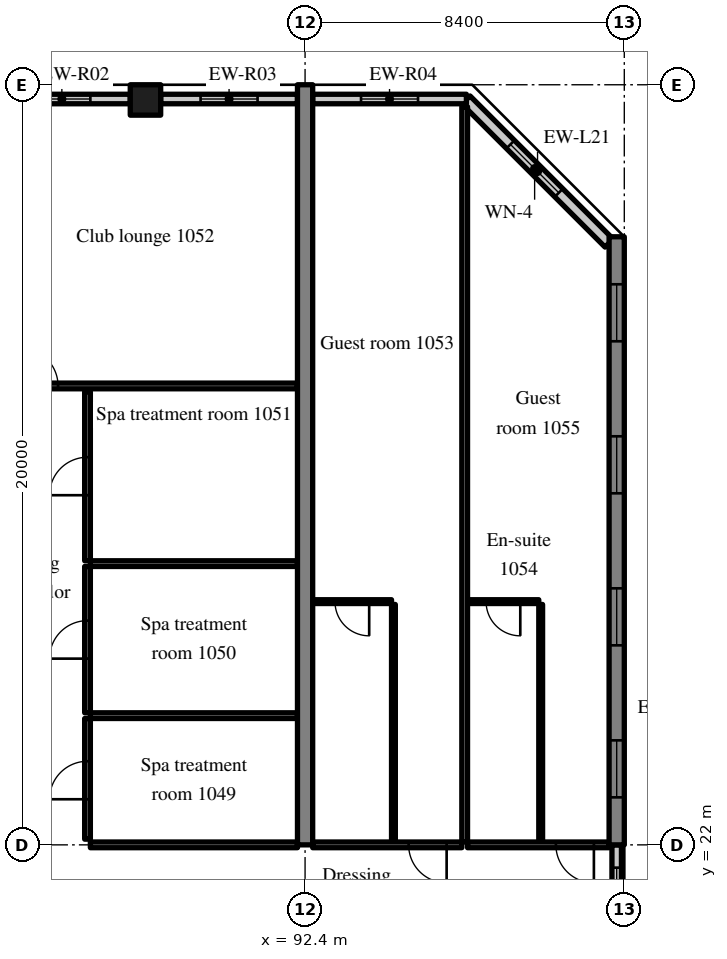
"""IFC4 building model, lengths in metres.
Left out: names, types, materials, properties, quantities, classifications, styles, units other than length and angle.
Written with IfcOpenShell. Run it as: python <this file> out.ifc"""

import sys

from ifc_helpers import new_model, si_unit, direction, frame, frame_2d, origin, origin_2d, place, context, subcontext, project, spatial, rectangle, extrude, source, transform, mapped, element, fill, save


model = new_model("IFC4")
c1 = context("Model", 3, precision=1e-05, world=origin(), true_north=direction((0.0, 1.0)))
c2 = subcontext(c1, "Body", "Model", "MODEL_VIEW")
j1 = project(units=[si_unit("LENGTHUNIT", "METRE"), si_unit("PLANEANGLEUNIT", "RADIAN")], contexts=[c1])
p1 = place(None, origin())
s1 = spatial("IfcSite", under=j1, at=p1, CompositionType="ELEMENT")
p2 = place(p1, origin())
s2 = spatial("IfcBuilding", under=s1, at=p2, CompositionType="ELEMENT")
p3 = place(p2, frame((0.0, 0.0, 46.8)))
s3 = spatial("IfcBuildingStorey", under=s2, at=p3, CompositionType="ELEMENT", Elevation=46.8)
m1 = source(origin(), c2, "Body", "SweptSolid", [
    extrude(rectangle(XDim=20.0, YDim=0.4, at=frame_2d((10.0, 0.0))), origin(), (0.0, 0.0, 1.0), 3.52),
])
p4 = place(p3, frame((92.4, 22.0, 0.0), z_axis=(0.0, 0.0, 1.0), x_axis=(0.0, 1.0, 0.0)))
e1 = element("IfcWall", 1, at=p4, inside=s3, PredefinedType="SHEAR", context=c2, shape_type="MappedRepresentation", body=[
    mapped(m1, transform((0.0, 0.0, 0.0), scale=1.0)),
])
m2 = source(origin(), c2, "Body", "SweptSolid", [
    extrude(rectangle(XDim=16.0, YDim=0.4, at=frame_2d((8.0, 0.0))), origin(), (0.0, 0.0, 1.0), 3.52),
])
p5 = place(p3, frame((100.6, 22.0, 0.0), z_axis=(0.0, 0.0, 1.0), x_axis=(0.0, 1.0, 0.0)))
e2 = element("IfcWall", 2, at=p5, inside=s3, PredefinedType="SHEAR", context=c2, shape_type="MappedRepresentation", body=[
    mapped(m2, transform((0.0, 0.0, 0.0), scale=1.0)),
])
m3 = source(origin(), c2, "Body", "SweptSolid", [
    extrude(rectangle(XDim=1.5, YDim=1.5, at=frame_2d((0.75, 0.75))), frame((0.0, 0.21, 0.0), z_axis=(0.0, -1.0, 0.0), x_axis=(1.0, 0.0, 0.0)), (0.0, 0.0, 1.0), 0.42),
])
p6 = place(p5, frame((1.25, 0.0, 0.9)))
e3 = element("IfcOpeningElement", 3, at=p6, cuts=e2, PredefinedType="OPENING", context=c2, shape_type="MappedRepresentation", body=[
    mapped(m3, transform((0.0, 0.0, 0.0), scale=1.0)),
])
p7 = place(p5, frame((5.25, 0.0, 0.9)))
e4 = element("IfcOpeningElement", 4, at=p7, cuts=e2, PredefinedType="OPENING", context=c2, shape_type="MappedRepresentation", body=[
    mapped(m3, transform((0.0, 0.0, 0.0), scale=1.0)),
])
p8 = place(p5, frame((9.25, 0.0, 0.9)))
e5 = element("IfcOpeningElement", 5, at=p8, cuts=e2, PredefinedType="OPENING", context=c2, shape_type="MappedRepresentation", body=[
    mapped(m3, transform((0.0, 0.0, 0.0), scale=1.0)),
])
p9 = place(p5, frame((13.25, 0.0, 0.9)))
e6 = element("IfcOpeningElement", 6, at=p9, cuts=e2, PredefinedType="OPENING", context=c2, shape_type="MappedRepresentation", body=[
    mapped(m3, transform((0.0, 0.0, 0.0), scale=1.0)),
])
m4 = source(origin(), c2, "Body", "SweptSolid", [
    extrude(rectangle(XDim=0.8, YDim=0.8, at=origin_2d()), origin(), (0.0, 0.0, 1.0), 3.52),
])
p10 = place(p3, frame((88.2, 41.6, 0.0), z_axis=(0.0, 0.0, 1.0), x_axis=(1.0, 0.0, 0.0)))
e7 = element("IfcColumn", 7, at=p10, inside=s3, PredefinedType="COLUMN", context=c2, shape_type="MappedRepresentation", body=[
    mapped(m4, transform((0.0, 0.0, 0.0), scale=1.0)),
])
m5 = source(origin(), c2, "Body", "SweptSolid", [
    extrude(rectangle(XDim=5.326, YDim=0.3, at=frame_2d((2.663, 0.0))), origin(), (0.0, 0.0, 1.0), 3.52),
])
p11 = place(p3, frame((100.4, 37.834, 0.0), z_axis=(0.0, 0.0, 1.0), x_axis=(-0.707083859269, 0.707129702361, 0.0)))
e8 = element("IfcWall", 8, at=p11, inside=s3, PredefinedType="SOLIDWALL", context=c2, shape_type="MappedRepresentation", body=[
    mapped(m5, transform((0.0, 0.0, 0.0), scale=1.0)),
])
m6 = source(origin(), c2, "Body", "SweptSolid", [
    extrude(rectangle(XDim=1.8, YDim=1.5, at=frame_2d((0.9, 0.75))), frame((0.0, 0.16, 0.0), z_axis=(0.0, -1.0, 0.0), x_axis=(1.0, 0.0, 0.0)), (0.0, 0.0, 1.0), 0.32),
])
p12 = place(p11, frame((1.871, 0.0, 0.9)))
e9 = element("IfcOpeningElement", 9, at=p12, cuts=e8, PredefinedType="OPENING", context=c2, shape_type="MappedRepresentation", body=[
    mapped(m6, transform((0.0, 0.0, 0.0), scale=1.0)),
])
m7 = source(origin(), c2, "Body", "SweptSolid", [
    extrude(rectangle(XDim=3.6, YDim=0.25, at=frame_2d((1.8, 0.0))), origin(), (0.0, 0.0, 1.0), 2.82),
])
p13 = place(p3, frame((87.8, 41.625, 0.0), z_axis=(0.0, 0.0, 1.0), x_axis=(-1.0, 0.0, 0.0)))
e10 = element("IfcWall", 10, at=p13, inside=s3, PredefinedType="SOLIDWALL", context=c2, shape_type="MappedRepresentation", body=[
    mapped(m7, transform((0.0, 0.0, 0.0), scale=1.0)),
])
m8 = source(origin(), c2, "Body", "SweptSolid", [
    extrude(rectangle(XDim=1.5, YDim=1.5, at=frame_2d((0.75, 0.75))), frame((0.0, 0.135, 0.0), z_axis=(0.0, -1.0, 0.0), x_axis=(1.0, 0.0, 0.0)), (0.0, 0.0, 1.0), 0.27),
])
p14 = place(p13, frame((1.05, 0.0, 0.9)))
e11 = element("IfcOpeningElement", 11, at=p14, cuts=e10, PredefinedType="OPENING", context=c2, shape_type="MappedRepresentation", body=[
    mapped(m8, transform((0.0, 0.0, 0.0), scale=1.0)),
])
m9 = source(origin(), c2, "Body", "SweptSolid", [
    extrude(rectangle(XDim=3.6, YDim=0.25, at=frame_2d((1.8, 0.0))), origin(), (0.0, 0.0, 1.0), 2.82),
])
p15 = place(p3, frame((92.2, 41.625, 0.0), z_axis=(0.0, 0.0, 1.0), x_axis=(-1.0, 0.0, 0.0)))
e12 = element("IfcWall", 12, at=p15, inside=s3, PredefinedType="SOLIDWALL", context=c2, shape_type="MappedRepresentation", body=[
    mapped(m9, transform((0.0, 0.0, 0.0), scale=1.0)),
])
p16 = place(p15, frame((1.05, 0.0, 0.9)))
e13 = element("IfcOpeningElement", 13, at=p16, cuts=e12, PredefinedType="OPENING", context=c2, shape_type="MappedRepresentation", body=[
    mapped(m8, transform((0.0, 0.0, 0.0), scale=1.0)),
])
m10 = source(origin(), c2, "Body", "SweptSolid", [
    extrude(rectangle(XDim=4.045, YDim=0.25, at=frame_2d((2.022, 0.0))), origin(), (0.0, 0.0, 1.0), 2.82),
])
p17 = place(p3, frame((96.645, 41.625, 0.0), z_axis=(0.0, 0.0, 1.0), x_axis=(-1.0, 0.0, 0.0)))
e14 = element("IfcWall", 14, at=p17, inside=s3, PredefinedType="SOLIDWALL", context=c2, shape_type="MappedRepresentation", body=[
    mapped(m10, transform((0.0, 0.0, 0.0), scale=1.0)),
])
p18 = place(p17, frame((1.272, 0.0, 0.9)))
e15 = element("IfcOpeningElement", 15, at=p18, cuts=e14, PredefinedType="OPENING", context=c2, shape_type="MappedRepresentation", body=[
    mapped(m8, transform((0.0, 0.0, 0.0), scale=1.0)),
])
m11 = source(origin(), c2, "Body", "SweptSolid", [
    extrude(rectangle(XDim=2.4, YDim=0.25, at=frame_2d((1.2, 0.0))), origin(), (0.0, 0.0, 1.0), 2.62),
])
p19 = place(p3, frame((100.6, 19.6, 0.0), z_axis=(0.0, 0.0, 1.0), x_axis=(0.0, 1.0, 0.0)))
e16 = element("IfcWall", 16, at=p19, inside=s3, PredefinedType="SOLIDWALL", context=c2, shape_type="MappedRepresentation", body=[
    mapped(m11, transform((0.0, 0.0, 0.0), scale=1.0)),
])
m12 = source(origin(), c2, "Body", "SweptSolid", [
    extrude(rectangle(XDim=1.2, YDim=1.5, at=frame_2d((0.6, 0.75))), frame((0.0, 0.135, 0.0), z_axis=(0.0, -1.0, 0.0), x_axis=(1.0, 0.0, 0.0)), (0.0, 0.0, 1.0), 0.27),
])
p20 = place(p19, frame((0.6, 0.0, 0.9)))
e17 = element("IfcOpeningElement", 17, at=p20, cuts=e16, PredefinedType="OPENING", context=c2, shape_type="MappedRepresentation", body=[
    mapped(m12, transform((0.0, 0.0, 0.0), scale=1.0)),
])
m13 = source(origin(), c2, "Body", "SweptSolid", [
    extrude(rectangle(XDim=5.45, YDim=0.15, at=frame_2d((2.725, 0.0))), origin(), (0.0, 0.0, 1.0), 2.82),
])
p21 = place(p3, frame((86.75, 22.0, 0.0), z_axis=(0.0, 0.0, 1.0), x_axis=(1.0, 0.0, 0.0)))
e18 = element("IfcWall", 18, at=p21, inside=s3, PredefinedType="PARTITIONING", context=c2, shape_type="MappedRepresentation", body=[
    mapped(m13, transform((0.0, 0.0, 0.0), scale=1.0)),
])
m14 = source(origin(), c2, "Body", "SweptSolid", [
    extrude(rectangle(XDim=3.175, YDim=0.15, at=frame_2d((1.587, 0.0))), origin(), (0.0, 0.0, 1.0), 3.52),
])
p22 = place(p3, frame((86.675, 22.15, 0.0), z_axis=(0.0, 0.0, 1.0), x_axis=(0.0, 1.0, 0.0)))
e19 = element("IfcWall", 19, at=p22, inside=s3, PredefinedType="PARTITIONING", context=c2, shape_type="MappedRepresentation", body=[
    mapped(m14, transform((0.0, 0.0, 0.0), scale=1.0)),
])
m15 = source(origin(), c2, "Body", "SweptSolid", [
    extrude(rectangle(XDim=1.0, YDim=2.1, at=frame_2d((0.5, 1.05))), frame((0.0, 0.085, 0.0), z_axis=(0.0, -1.0, 0.0), x_axis=(1.0, 0.0, 0.0)), (0.0, 0.0, 1.0), 0.17),
])
p23 = place(p22, frame((1.05, 0.0, 0.0)))
e20 = element("IfcOpeningElement", 20, at=p23, cuts=e19, PredefinedType="OPENING", context=c2, shape_type="MappedRepresentation", body=[
    mapped(m15, transform((0.0, 0.0, 0.0), scale=1.0)),
])
m16 = source(origin(), c2, "Body", "SweptSolid", [
    extrude(rectangle(XDim=5.45, YDim=0.15, at=frame_2d((2.725, 0.0))), origin(), (0.0, 0.0, 1.0), 3.52),
])
p24 = place(p3, frame((86.75, 25.4, 0.0), z_axis=(0.0, 0.0, 1.0), x_axis=(1.0, 0.0, 0.0)))
e21 = element("IfcWall", 21, at=p24, inside=s3, PredefinedType="PARTITIONING", context=c2, shape_type="MappedRepresentation", body=[
    mapped(m16, transform((0.0, 0.0, 0.0), scale=1.0)),
])
m17 = source(origin(), c2, "Body", "SweptSolid", [
    extrude(rectangle(XDim=3.85, YDim=0.15, at=frame_2d((1.925, 0.0))), origin(), (0.0, 0.0, 1.0), 3.52),
])
p25 = place(p3, frame((86.675, 25.475, 0.0), z_axis=(0.0, 0.0, 1.0), x_axis=(0.0, 1.0, 0.0)))
e22 = element("IfcWall", 22, at=p25, inside=s3, PredefinedType="PARTITIONING", context=c2, shape_type="MappedRepresentation", body=[
    mapped(m17, transform((0.0, 0.0, 0.0), scale=1.0)),
])
p26 = place(p25, frame((1.425, 0.0, 0.0)))
e23 = element("IfcOpeningElement", 23, at=p26, cuts=e22, PredefinedType="OPENING", context=c2, shape_type="MappedRepresentation", body=[
    mapped(m15, transform((0.0, 0.0, 0.0), scale=1.0)),
])
p27 = place(p3, frame((86.75, 29.4, 0.0), z_axis=(0.0, 0.0, 1.0), x_axis=(1.0, 0.0, 0.0)))
e24 = element("IfcWall", 24, at=p27, inside=s3, PredefinedType="PARTITIONING", context=c2, shape_type="MappedRepresentation", body=[
    mapped(m16, transform((0.0, 0.0, 0.0), scale=1.0)),
])
m18 = source(origin(), c2, "Body", "SweptSolid", [
    extrude(rectangle(XDim=4.45, YDim=0.15, at=frame_2d((2.225, 0.0))), origin(), (0.0, 0.0, 1.0), 3.52),
])
p28 = place(p3, frame((86.675, 29.475, 0.0), z_axis=(0.0, 0.0, 1.0), x_axis=(0.0, 1.0, 0.0)))
e25 = element("IfcWall", 25, at=p28, inside=s3, PredefinedType="PARTITIONING", context=c2, shape_type="MappedRepresentation", body=[
    mapped(m18, transform((0.0, 0.0, 0.0), scale=1.0)),
])
p29 = place(p28, frame((1.725, 0.0, 0.0)))
e26 = element("IfcOpeningElement", 26, at=p29, cuts=e25, PredefinedType="OPENING", context=c2, shape_type="MappedRepresentation", body=[
    mapped(m15, transform((0.0, 0.0, 0.0), scale=1.0)),
])
m19 = source(origin(), c2, "Body", "SweptSolid", [
    extrude(rectangle(XDim=8.0, YDim=0.15, at=frame_2d((4.0, 0.0))), origin(), (0.0, 0.0, 1.0), 3.52),
])
p30 = place(p3, frame((84.2, 34.075, 0.0), z_axis=(0.0, 0.0, 1.0), x_axis=(1.0, 0.0, 0.0)))
e27 = element("IfcWall", 27, at=p30, inside=s3, PredefinedType="PARTITIONING", context=c2, shape_type="MappedRepresentation", body=[
    mapped(m19, transform((0.0, 0.0, 0.0), scale=1.0)),
])
p31 = place(p30, frame((0.7, 0.0, 0.0)))
e28 = element("IfcOpeningElement", 28, at=p31, cuts=e27, PredefinedType="OPENING", context=c2, shape_type="MappedRepresentation", body=[
    mapped(m15, transform((0.0, 0.0, 0.0), scale=1.0)),
])
m20 = source(origin(), c2, "Body", "SweptSolid", [
    extrude(rectangle(XDim=6.25, YDim=0.1, at=frame_2d((3.125, 0.0))), origin(), (0.0, 0.0, 1.0), 3.52),
])
p32 = place(p3, frame((94.725, 22.075, 0.0), z_axis=(0.0, 0.0, 1.0), x_axis=(0.0, 1.0, 0.0)))
e29 = element("IfcWall", 29, at=p32, inside=s3, PredefinedType="PARTITIONING", context=c2, shape_type="MappedRepresentation", body=[
    mapped(m20, transform((0.0, 0.0, 0.0), scale=1.0)),
])
m21 = source(origin(), c2, "Body", "SweptSolid", [
    extrude(rectangle(XDim=2.075, YDim=0.1, at=frame_2d((1.038, 0.0))), origin(), (0.0, 0.0, 1.0), 3.52),
])
p33 = place(p3, frame((92.6, 28.4, 0.0), z_axis=(0.0, 0.0, 1.0), x_axis=(1.0, 0.0, 0.0)))
e30 = element("IfcWall", 30, at=p33, inside=s3, PredefinedType="PARTITIONING", context=c2, shape_type="MappedRepresentation", body=[
    mapped(m21, transform((0.0, 0.0, 0.0), scale=1.0)),
])
m22 = source(origin(), c2, "Body", "SweptSolid", [
    extrude(rectangle(XDim=0.9, YDim=2.1, at=frame_2d((0.45, 1.05))), frame((0.0, 0.06, 0.0), z_axis=(0.0, -1.0, 0.0), x_axis=(1.0, 0.0, 0.0)), (0.0, 0.0, 1.0), 0.12),
])
p34 = place(p33, frame((0.587, 0.0, 0.0)))
e31 = element("IfcOpeningElement", 31, at=p34, cuts=e30, PredefinedType="OPENING", context=c2, shape_type="MappedRepresentation", body=[
    mapped(m22, transform((0.0, 0.0, 0.0), scale=1.0)),
])
m23 = source(origin(), c2, "Body", "SweptSolid", [
    extrude(rectangle(XDim=3.925, YDim=0.15, at=frame_2d((1.962, 0.0))), origin(), (0.0, 0.0, 1.0), 2.82),
])
p35 = place(p3, frame((92.6, 22.0, 0.0), z_axis=(0.0, 0.0, 1.0), x_axis=(1.0, 0.0, 0.0)))
e32 = element("IfcWall", 32, at=p35, inside=s3, PredefinedType="PARTITIONING", context=c2, shape_type="MappedRepresentation", body=[
    mapped(m23, transform((0.0, 0.0, 0.0), scale=1.0)),
])
p36 = place(p35, frame((2.525, 0.0, 0.0)))
e33 = element("IfcOpeningElement", 33, at=p36, cuts=e32, PredefinedType="OPENING", context=c2, shape_type="MappedRepresentation", body=[
    mapped(m15, transform((0.0, 0.0, 0.0), scale=1.0)),
])
p37 = place(p3, frame((98.6, 22.075, 0.0), z_axis=(0.0, 0.0, 1.0), x_axis=(0.0, 1.0, 0.0)))
e34 = element("IfcWall", 34, at=p37, inside=s3, PredefinedType="PARTITIONING", context=c2, shape_type="MappedRepresentation", body=[
    mapped(m20, transform((0.0, 0.0, 0.0), scale=1.0)),
])
m24 = source(origin(), c2, "Body", "SweptSolid", [
    extrude(rectangle(XDim=1.875, YDim=0.1, at=frame_2d((0.938, 0.0))), origin(), (0.0, 0.0, 1.0), 3.52),
])
p38 = place(p3, frame((96.675, 28.4, 0.0), z_axis=(0.0, 0.0, 1.0), x_axis=(1.0, 0.0, 0.0)))
e35 = element("IfcWall", 35, at=p38, inside=s3, PredefinedType="PARTITIONING", context=c2, shape_type="MappedRepresentation", body=[
    mapped(m24, transform((0.0, 0.0, 0.0), scale=1.0)),
])
p39 = place(p38, frame((0.488, 0.0, 0.0)))
e36 = element("IfcOpeningElement", 36, at=p39, cuts=e35, PredefinedType="OPENING", context=c2, shape_type="MappedRepresentation", body=[
    mapped(m22, transform((0.0, 0.0, 0.0), scale=1.0)),
])
m25 = source(origin(), c2, "Body", "SweptSolid", [
    extrude(rectangle(XDim=3.725, YDim=0.15, at=frame_2d((1.862, 0.0))), origin(), (0.0, 0.0, 1.0), 2.82),
])
p40 = place(p3, frame((96.675, 22.0, 0.0), z_axis=(0.0, 0.0, 1.0), x_axis=(1.0, 0.0, 0.0)))
e37 = element("IfcWall", 37, at=p40, inside=s3, PredefinedType="PARTITIONING", context=c2, shape_type="MappedRepresentation", body=[
    mapped(m25, transform((0.0, 0.0, 0.0), scale=1.0)),
])
p41 = place(p40, frame((2.325, 0.0, 0.0)))
e38 = element("IfcOpeningElement", 38, at=p41, cuts=e37, PredefinedType="OPENING", context=c2, shape_type="MappedRepresentation", body=[
    mapped(m15, transform((0.0, 0.0, 0.0), scale=1.0)),
])
m26 = source(origin(), c2, "Body", "SweptSolid", [
    extrude(rectangle(XDim=19.347, YDim=0.15, at=frame_2d((9.674, 0.0))), origin(), (0.0, 0.0, 1.0), 3.52),
])
p42 = place(p3, frame((96.6, 22.075, 0.0), z_axis=(0.0, 0.0, 1.0), x_axis=(0.0, 1.0, 0.0)))
e39 = element("IfcWall", 39, at=p42, inside=s3, PredefinedType="PARTITIONING", context=c2, shape_type="MappedRepresentation", body=[
    mapped(m26, transform((0.0, 0.0, 0.0), scale=1.0)),
])
m27 = source(origin(), c2, "Body", "SweptSolid", [
    extrude(rectangle(XDim=1.8, YDim=1.5, at=frame_2d((0.9, 0.75))), frame((0.0, 0.03, 0.0), z_axis=(0.0, -1.0, 0.0), x_axis=(1.0, 0.0, 0.0)), (0.0, 0.0, 1.0), 0.06),
])
p43 = place(p12, origin())
e40 = element("IfcWindow", 40, at=p43, inside=s3, PartitioningType="SINGLE_PANEL", PredefinedType="WINDOW", context=c2, shape_type="MappedRepresentation", body=[
    mapped(m27, transform((0.0, 0.0, 0.0), scale=1.0)),
])
fill(e9, e40)
m28 = source(origin(), c2, "Body", "SweptSolid", [
    extrude(rectangle(XDim=1.5, YDim=1.5, at=frame_2d((0.75, 0.75))), frame((0.0, 0.03, 0.0), z_axis=(0.0, -1.0, 0.0), x_axis=(1.0, 0.0, 0.0)), (0.0, 0.0, 1.0), 0.06),
])
p44 = place(p14, origin())
e41 = element("IfcWindow", 41, at=p44, inside=s3, PartitioningType="SINGLE_PANEL", PredefinedType="WINDOW", context=c2, shape_type="MappedRepresentation", body=[
    mapped(m28, transform((0.0, 0.0, 0.0), scale=1.0)),
])
fill(e11, e41)
p45 = place(p16, origin())
e42 = element("IfcWindow", 42, at=p45, inside=s3, PartitioningType="SINGLE_PANEL", PredefinedType="WINDOW", context=c2, shape_type="MappedRepresentation", body=[
    mapped(m28, transform((0.0, 0.0, 0.0), scale=1.0)),
])
fill(e13, e42)
p46 = place(p18, origin())
e43 = element("IfcWindow", 43, at=p46, inside=s3, PartitioningType="SINGLE_PANEL", PredefinedType="WINDOW", context=c2, shape_type="MappedRepresentation", body=[
    mapped(m28, transform((0.0, 0.0, 0.0), scale=1.0)),
])
fill(e15, e43)
p47 = place(p6, origin())
e44 = element("IfcWindow", 44, at=p47, inside=s3, PartitioningType="SINGLE_PANEL", PredefinedType="WINDOW", context=c2, shape_type="MappedRepresentation", body=[
    mapped(m28, transform((0.0, 0.0, 0.0), scale=1.0)),
])
fill(e3, e44)
p48 = place(p7, origin())
e45 = element("IfcWindow", 45, at=p48, inside=s3, PartitioningType="SINGLE_PANEL", PredefinedType="WINDOW", context=c2, shape_type="MappedRepresentation", body=[
    mapped(m28, transform((0.0, 0.0, 0.0), scale=1.0)),
])
fill(e4, e45)
p49 = place(p8, origin())
e46 = element("IfcWindow", 46, at=p49, inside=s3, PartitioningType="SINGLE_PANEL", PredefinedType="WINDOW", context=c2, shape_type="MappedRepresentation", body=[
    mapped(m28, transform((0.0, 0.0, 0.0), scale=1.0)),
])
fill(e5, e46)
p50 = place(p9, origin())
e47 = element("IfcWindow", 47, at=p50, inside=s3, PartitioningType="SINGLE_PANEL", PredefinedType="WINDOW", context=c2, shape_type="MappedRepresentation", body=[
    mapped(m28, transform((0.0, 0.0, 0.0), scale=1.0)),
])
fill(e6, e47)
m29 = source(origin(), c2, "Body", "SweptSolid", [
    extrude(rectangle(XDim=1.2, YDim=1.5, at=frame_2d((0.6, 0.75))), frame((0.0, 0.03, 0.0), z_axis=(0.0, -1.0, 0.0), x_axis=(1.0, 0.0, 0.0)), (0.0, 0.0, 1.0), 0.06),
])
p51 = place(p20, origin())
e48 = element("IfcWindow", 48, at=p51, inside=s3, PartitioningType="SINGLE_PANEL", PredefinedType="WINDOW", context=c2, shape_type="MappedRepresentation", body=[
    mapped(m29, transform((0.0, 0.0, 0.0), scale=1.0)),
])
fill(e17, e48)
m30 = source(origin(), c2, "Body", "SweptSolid", [
    extrude(rectangle(XDim=1.0, YDim=2.1, at=frame_2d((0.5, 1.05))), frame((0.0, 0.025, 0.0), z_axis=(0.0, -1.0, 0.0), x_axis=(1.0, 0.0, 0.0)), (0.0, 0.0, 1.0), 0.05),
])
p52 = place(p23, origin())
e49 = element("IfcDoor", 49, at=p52, inside=s3, OperationType="SINGLE_SWING_LEFT", PredefinedType="DOOR", context=c2, shape_type="MappedRepresentation", body=[
    mapped(m30, transform((0.0, 0.0, 0.0), scale=1.0)),
])
fill(e20, e49)
p53 = place(p26, origin())
e50 = element("IfcDoor", 50, at=p53, inside=s3, OperationType="SINGLE_SWING_LEFT", PredefinedType="DOOR", context=c2, shape_type="MappedRepresentation", body=[
    mapped(m30, transform((0.0, 0.0, 0.0), scale=1.0)),
])
fill(e23, e50)
p54 = place(p29, origin())
e51 = element("IfcDoor", 51, at=p54, inside=s3, OperationType="SINGLE_SWING_LEFT", PredefinedType="DOOR", context=c2, shape_type="MappedRepresentation", body=[
    mapped(m30, transform((0.0, 0.0, 0.0), scale=1.0)),
])
fill(e26, e51)
p55 = place(p31, origin())
e52 = element("IfcDoor", 52, at=p55, inside=s3, OperationType="SINGLE_SWING_LEFT", PredefinedType="DOOR", context=c2, shape_type="MappedRepresentation", body=[
    mapped(m30, transform((0.0, 0.0, 0.0), scale=1.0)),
])
fill(e28, e52)
m31 = source(origin(), c2, "Body", "SweptSolid", [
    extrude(rectangle(XDim=0.9, YDim=2.1, at=frame_2d((0.45, 1.05))), frame((0.0, 0.025, 0.0), z_axis=(0.0, -1.0, 0.0), x_axis=(1.0, 0.0, 0.0)), (0.0, 0.0, 1.0), 0.05),
])
p56 = place(p34, origin())
e53 = element("IfcDoor", 53, at=p56, inside=s3, OperationType="SINGLE_SWING_RIGHT", PredefinedType="DOOR", context=c2, shape_type="MappedRepresentation", body=[
    mapped(m31, transform((0.0, 0.0, 0.0), scale=1.0)),
])
fill(e31, e53)
p57 = place(p36, origin())
e54 = element("IfcDoor", 54, at=p57, inside=s3, OperationType="SINGLE_SWING_RIGHT", PredefinedType="DOOR", context=c2, shape_type="MappedRepresentation", body=[
    mapped(m30, transform((0.0, 0.0, 0.0), scale=1.0)),
])
fill(e33, e54)
p58 = place(p39, origin())
e55 = element("IfcDoor", 55, at=p58, inside=s3, OperationType="SINGLE_SWING_RIGHT", PredefinedType="DOOR", context=c2, shape_type="MappedRepresentation", body=[
    mapped(m31, transform((0.0, 0.0, 0.0), scale=1.0)),
])
fill(e36, e55)
p59 = place(p41, origin())
e56 = element("IfcDoor", 56, at=p59, inside=s3, OperationType="SINGLE_SWING_RIGHT", PredefinedType="DOOR", context=c2, shape_type="MappedRepresentation", body=[
    mapped(m30, transform((0.0, 0.0, 0.0), scale=1.0)),
])
fill(e38, e56)
save(model, sys.argv[1])
